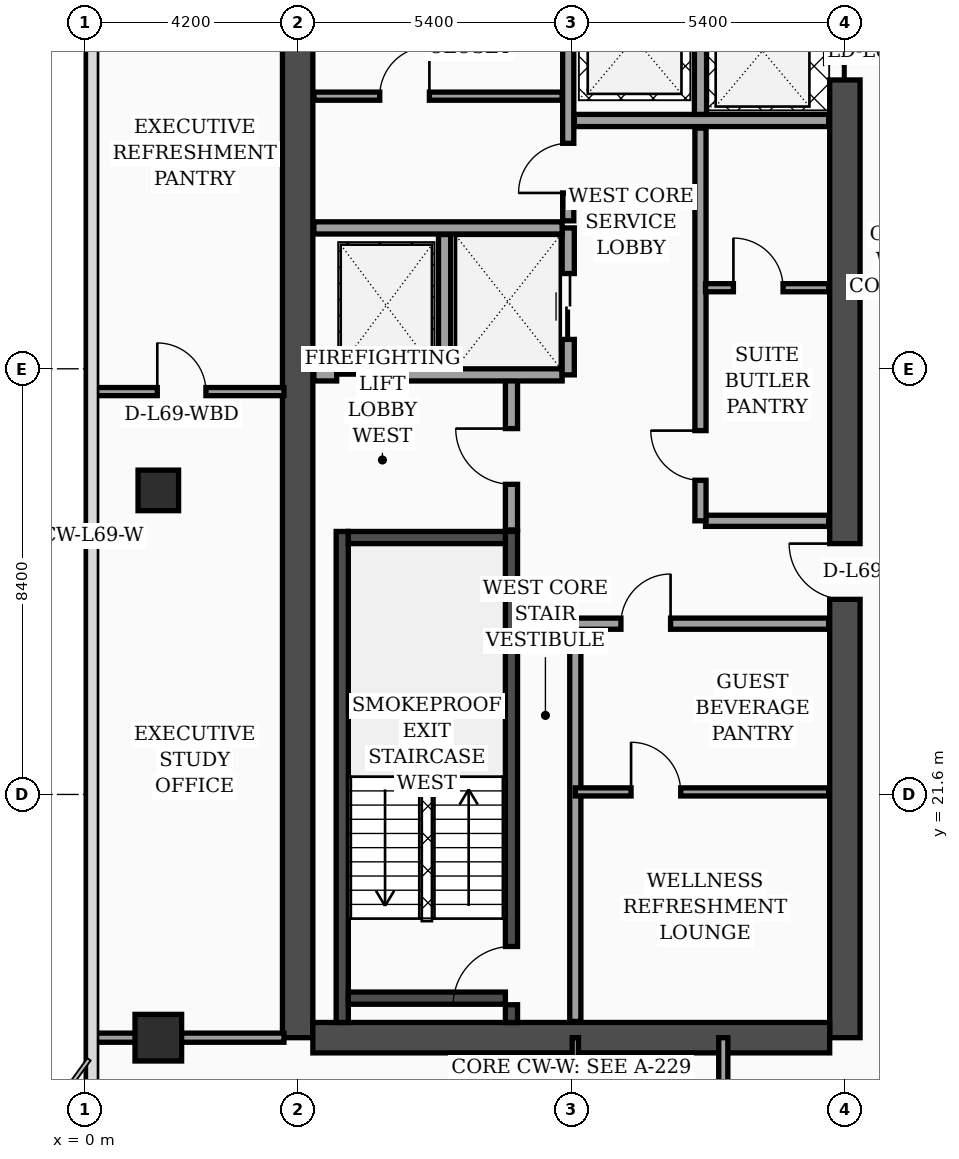
"""IFC4 building model, lengths in metres.
Left out: names, types, materials, properties, quantities, classifications, styles, units other than length and angle.
Written with IfcOpenShell. Run it as: python <this file> out.ifc"""

import sys

from ifc_helpers import new_model, si_unit, direction, frame, frame_2d, origin, origin_2d, place, context, subcontext, project, spatial, rectangle, extrude, element, fill, save


model = new_model("IFC4")
c1 = context("Model", 3, precision=1e-05, world=origin(), true_north=direction((0.0, 1.0)))
c2 = subcontext(c1, "Body", "Model", "MODEL_VIEW")
j1 = project(units=[si_unit("LENGTHUNIT", "METRE"), si_unit("PLANEANGLEUNIT", "RADIAN")], contexts=[c1])
p1 = place(None, origin())
s1 = spatial("IfcSite", under=j1, at=p1, CompositionType="ELEMENT")
p2 = place(p1, origin())
s2 = spatial("IfcBuilding", under=s1, at=p2, CompositionType="ELEMENT")
p3 = place(p2, frame((0.0, 0.0, 278.7)))
s3 = spatial("IfcBuildingStorey", under=s2, at=p3, CompositionType="ELEMENT", Elevation=278.7)
p4 = place(p3, frame((4.2, 16.8, 0.0), z_axis=(0.0, 0.0, 1.0), x_axis=(0.0, 1.0, 0.0)))
e1 = element("IfcWall", 1, at=p4, inside=s3, PredefinedType="SHEAR", context=c2, shape_type="SweptSolid", body=[
    extrude(rectangle(XDim=21.6, YDim=0.6, at=frame_2d((10.8, 0.0))), origin(), (0.0, 0.0, 1.0), 3.52),
])
p5 = place(p3, frame((15.0, 16.8, 0.0), z_axis=(0.0, 0.0, 1.0), x_axis=(0.0, 1.0, 0.0)))
e2 = element("IfcWall", 2, at=p5, inside=s3, PredefinedType="SHEAR", context=c2, shape_type="SweptSolid", body=[
    extrude(rectangle(XDim=21.6, YDim=0.6, at=frame_2d((10.8, 0.0))), origin(), (0.0, 0.0, 1.0), 3.52),
])
p6 = place(p5, frame((8.65, 0.0, 0.0)))
e3 = element("IfcOpeningElement", 3, at=p6, cuts=e2, PredefinedType="OPENING", context=c2, shape_type="SweptSolid", body=[
    extrude(rectangle(XDim=1.1, YDim=2.2, at=frame_2d((0.55, 1.1))), frame((0.0, 0.31, 0.0), z_axis=(0.0, -1.0, 0.0), x_axis=(1.0, 0.0, 0.0)), (0.0, 0.0, 1.0), 0.62),
])
p7 = place(p5, frame((18.9, 0.0, 0.0)))
e4 = element("IfcOpeningElement", 4, at=p7, cuts=e2, PredefinedType="OPENING", context=c2, shape_type="SweptSolid", body=[
    extrude(rectangle(XDim=1.1, YDim=2.2, at=frame_2d((0.55, 1.1))), frame((0.0, 0.31, 0.0), z_axis=(0.0, -1.0, 0.0), x_axis=(1.0, 0.0, 0.0)), (0.0, 0.0, 1.0), 0.62),
])
p8 = place(p3, frame((4.5, 16.8, 0.0), z_axis=(0.0, 0.0, 1.0), x_axis=(1.0, 0.0, 0.0)))
e5 = element("IfcWall", 5, at=p8, inside=s3, PredefinedType="SHEAR", context=c2, shape_type="SweptSolid", body=[
    extrude(rectangle(XDim=10.2, YDim=0.6, at=frame_2d((5.1, 0.0))), origin(), (0.0, 0.0, 1.0), 3.52),
])
p9 = place(p3, frame((5.08, 17.1, 0.0), z_axis=(0.0, 0.0, 1.0), x_axis=(0.0, 1.0, 0.0)))
e6 = element("IfcWall", 6, at=p9, inside=s3, PredefinedType="SOLIDWALL", context=c2, shape_type="SweptSolid", body=[
    extrude(rectangle(XDim=9.69, YDim=0.24, at=frame_2d((4.845, 0.0))), origin(), (0.0, 0.0, 1.0), 3.52),
])
p10 = place(p3, frame((8.42, 17.1, 0.0), z_axis=(0.0, 0.0, 1.0), x_axis=(0.0, 1.0, 0.0)))
e7 = element("IfcWall", 7, at=p10, inside=s3, PredefinedType="SOLIDWALL", context=c2, shape_type="SweptSolid", body=[
    extrude(rectangle(XDim=9.69, YDim=0.24, at=frame_2d((4.845, 0.0))), origin(), (0.0, 0.0, 1.0), 3.52),
])
p11 = place(p10, frame((0.35, 0.0, 0.0)))
e8 = element("IfcOpeningElement", 8, at=p11, cuts=e7, PredefinedType="OPENING", context=c2, shape_type="SweptSolid", body=[
    extrude(rectangle(XDim=1.15, YDim=2.2, at=frame_2d((0.575, 1.1))), frame((0.0, 0.13, 0.0), z_axis=(0.0, -1.0, 0.0), x_axis=(1.0, 0.0, 0.0)), (0.0, 0.0, 1.0), 0.26),
])
for number, where, z_axis, x_axis in (
    (9, (5.2, 17.58, 0.0), (0.0, 0.0, 1.0), (1.0, 0.0, 0.0)),
    (10, (5.2, 26.67, 0.0), (0.0, 0.0, 1.0), (1.0, 0.0, 0.0)),
):
    element("IfcWall", number, at=place(p3, frame(where, z_axis=z_axis, x_axis=x_axis)), inside=s3, PredefinedType="SOLIDWALL", context=c2, shape_type="SweptSolid", body=[
        extrude(rectangle(XDim=3.1, YDim=0.24, at=frame_2d((1.55, 0.0))), origin(), (0.0, 0.0, 1.0), 3.52),
    ])
p12 = place(p3, frame((1.45, 16.8, 0.0), z_axis=(0.0, 0.0, 1.0), x_axis=(1.0, 0.0, 0.0)))
e11 = element("IfcColumn", 11, at=p12, inside=s3, PredefinedType="COLUMN", context=c2, shape_type="SweptSolid", body=[
    extrude(rectangle(XDim=0.92, YDim=0.92, at=origin_2d()), origin(), (0.0, 0.0, 1.0), 3.52),
])
p13 = place(p3, frame((1.45, 27.6, 0.0), z_axis=(0.0, 0.0, 1.0), x_axis=(1.0, 0.0, 0.0)))
e12 = element("IfcColumn", 12, at=p13, inside=s3, PredefinedType="COLUMN", context=c2, shape_type="SweptSolid", body=[
    extrude(rectangle(XDim=0.8, YDim=0.8, at=origin_2d()), origin(), (0.0, 0.0, 1.0), 3.52),
])
p14 = place(p3, frame((8.42, 26.82, 0.0), z_axis=(0.0, 0.0, 1.0), x_axis=(0.0, 1.0, 0.0)))
e13 = element("IfcWall", 13, at=p14, inside=s3, PredefinedType="SOLIDWALL", context=c2, shape_type="SweptSolid", body=[
    extrude(rectangle(XDim=3.0, YDim=0.24, at=frame_2d((1.5, 0.0))), origin(), (0.0, 0.0, 1.0), 3.52),
])
p15 = place(p14, frame((0.9, 0.0, 0.0)))
e14 = element("IfcOpeningElement", 14, at=p15, cuts=e13, PredefinedType="OPENING", context=c2, shape_type="SweptSolid", body=[
    extrude(rectangle(XDim=1.1, YDim=2.2, at=frame_2d((0.55, 1.1))), frame((0.0, 0.13, 0.0), z_axis=(0.0, -1.0, 0.0), x_axis=(1.0, 0.0, 0.0)), (0.0, 0.0, 1.0), 0.26),
])
p16 = place(p3, frame((4.52, 29.88, 0.0), z_axis=(0.0, 0.0, 1.0), x_axis=(1.0, 0.0, 0.0)))
e15 = element("IfcWall", 15, at=p16, inside=s3, PredefinedType="SOLIDWALL", context=c2, shape_type="SweptSolid", body=[
    extrude(rectangle(XDim=4.9, YDim=0.24, at=frame_2d((2.45, 0.0))), origin(), (0.0, 0.0, 1.0), 3.52),
])
p17 = place(p16, frame((0.45, 0.0, 0.0)))
e16 = element("IfcOpeningElement", 16, at=p17, cuts=e15, PredefinedType="OPENING", context=c2, shape_type="SweptSolid", body=[
    extrude(rectangle(XDim=1.3, YDim=2.35, at=frame_2d((0.65, 1.175))), frame((0.0, 0.13, 0.0), z_axis=(0.0, -1.0, 0.0), x_axis=(1.0, 0.0, 0.0)), (0.0, 0.0, 1.0), 0.26),
])
p18 = place(p3, frame((7.1, 30.02, 0.0), z_axis=(0.0, 0.0, 1.0), x_axis=(0.0, 1.0, 0.0)))
e17 = element("IfcWall", 17, at=p18, inside=s3, PredefinedType="SOLIDWALL", context=c2, shape_type="SweptSolid", body=[
    extrude(rectangle(XDim=2.63, YDim=0.24, at=frame_2d((1.315, 0.0))), origin(), (0.0, 0.0, 1.0), 3.52),
])
p19 = place(p3, frame((9.54, 29.88, 0.0), z_axis=(0.0, 0.0, 1.0), x_axis=(0.0, 1.0, 0.0)))
e18 = element("IfcWall", 18, at=p19, inside=s3, PredefinedType="SOLIDWALL", context=c2, shape_type="SweptSolid", body=[
    extrude(rectangle(XDim=2.9, YDim=0.24, at=frame_2d((1.45, 0.0))), origin(), (0.0, 0.0, 1.0), 3.52),
])
p20 = place(p19, frame((0.7, 0.0, 0.0)))
e19 = element("IfcOpeningElement", 19, at=p20, cuts=e18, PredefinedType="OPENING", context=c2, shape_type="SweptSolid", body=[
    extrude(rectangle(XDim=1.3, YDim=2.35, at=frame_2d((0.65, 1.175))), frame((0.0, 0.13, 0.0), z_axis=(0.0, -1.0, 0.0), x_axis=(1.0, 0.0, 0.0)), (0.0, 0.0, 1.0), 0.26),
])
p21 = place(p3, frame((4.52, 32.78, 0.0), z_axis=(0.0, 0.0, 1.0), x_axis=(1.0, 0.0, 0.0)))
e20 = element("IfcWall", 20, at=p21, inside=s3, PredefinedType="SOLIDWALL", context=c2, shape_type="SweptSolid", body=[
    extrude(rectangle(XDim=4.9, YDim=0.24, at=frame_2d((2.45, 0.0))), origin(), (0.0, 0.0, 1.0), 3.17),
])
p22 = place(p3, frame((9.68, 17.12, 0.0), z_axis=(0.0, 0.0, 1.0), x_axis=(0.0, 1.0, 0.0)))
e21 = element("IfcWall", 21, at=p22, inside=s3, PredefinedType="SOLIDWALL", context=c2, shape_type="SweptSolid", body=[
    extrude(rectangle(XDim=7.88, YDim=0.22, at=frame_2d((3.94, 0.0))), origin(), (0.0, 0.0, 1.0), 3.52),
])
p23 = place(p3, frame((4.52, 35.38, 0.0), z_axis=(0.0, 0.0, 1.0), x_axis=(1.0, 0.0, 0.0)))
e22 = element("IfcWall", 22, at=p23, inside=s3, PredefinedType="PARTITIONING", context=c2, shape_type="SweptSolid", body=[
    extrude(rectangle(XDim=4.9, YDim=0.16, at=frame_2d((2.45, 0.0))), origin(), (0.0, 0.0, 1.0), 3.52),
])
p24 = place(p23, frame((1.3, 0.0, 0.0)))
e23 = element("IfcOpeningElement", 23, at=p24, cuts=e22, PredefinedType="OPENING", context=c2, shape_type="SweptSolid", body=[
    extrude(rectangle(XDim=0.98, YDim=2.15, at=frame_2d((0.49, 1.075))), frame((0.0, 0.09, 0.0), z_axis=(0.0, -1.0, 0.0), x_axis=(1.0, 0.0, 0.0)), (0.0, 0.0, 1.0), 0.18),
])
p25 = place(p3, frame((9.54, 32.92, 0.0), z_axis=(0.0, 0.0, 1.0), x_axis=(0.0, 1.0, 0.0)))
e24 = element("IfcWall", 24, at=p25, inside=s3, PredefinedType="SOLIDWALL", context=c2, shape_type="SweptSolid", body=[
    extrude(rectangle(XDim=5.16, YDim=0.22, at=frame_2d((2.58, 0.0))), origin(), (0.0, 0.0, 1.0), 3.52),
])
p26 = place(p25, frame((0.55, 0.0, 0.0)))
e25 = element("IfcOpeningElement", 25, at=p26, cuts=e24, PredefinedType="OPENING", context=c2, shape_type="SweptSolid", body=[
    extrude(rectangle(XDim=0.98, YDim=2.15, at=frame_2d((0.49, 1.075))), frame((0.0, 0.12, 0.0), z_axis=(0.0, -1.0, 0.0), x_axis=(1.0, 0.0, 0.0)), (0.0, 0.0, 1.0), 0.24),
])
p27 = place(p3, frame((9.68, 21.65, 0.0), z_axis=(0.0, 0.0, 1.0), x_axis=(1.0, 0.0, 0.0)))
e26 = element("IfcWall", 26, at=p27, inside=s3, PredefinedType="PARTITIONING", context=c2, shape_type="SweptSolid", body=[
    extrude(rectangle(XDim=5.0, YDim=0.16, at=frame_2d((2.5, 0.0))), origin(), (0.0, 0.0, 1.0), 3.52),
])
p28 = place(p27, frame((1.1, 0.0, 0.0)))
e27 = element("IfcOpeningElement", 27, at=p28, cuts=e26, PredefinedType="OPENING", context=c2, shape_type="SweptSolid", body=[
    extrude(rectangle(XDim=0.98, YDim=2.15, at=frame_2d((0.49, 1.075))), frame((0.0, 0.09, 0.0), z_axis=(0.0, -1.0, 0.0), x_axis=(1.0, 0.0, 0.0)), (0.0, 0.0, 1.0), 0.18),
])
p29 = place(p3, frame((9.68, 24.97, 0.0), z_axis=(0.0, 0.0, 1.0), x_axis=(1.0, 0.0, 0.0)))
e28 = element("IfcWall", 28, at=p29, inside=s3, PredefinedType="SOLIDWALL", context=c2, shape_type="SweptSolid", body=[
    extrude(rectangle(XDim=5.0, YDim=0.22, at=frame_2d((2.5, 0.0))), origin(), (0.0, 0.0, 1.0), 2.97),
])
p30 = place(p29, frame((0.9, 0.0, 0.0)))
e29 = element("IfcOpeningElement", 29, at=p30, cuts=e28, PredefinedType="OPENING", context=c2, shape_type="SweptSolid", body=[
    extrude(rectangle(XDim=0.98, YDim=2.15, at=frame_2d((0.49, 1.075))), frame((0.0, 0.12, 0.0), z_axis=(0.0, -1.0, 0.0), x_axis=(1.0, 0.0, 0.0)), (0.0, 0.0, 1.0), 0.24),
])
p31 = place(p3, frame((12.25, 27.0, 0.0), z_axis=(0.0, 0.0, 1.0), x_axis=(1.0, 0.0, 0.0)))
e30 = element("IfcWall", 30, at=p31, inside=s3, PredefinedType="SOLIDWALL", context=c2, shape_type="SweptSolid", body=[
    extrude(rectangle(XDim=2.43, YDim=0.22, at=frame_2d((1.215, 0.0))), origin(), (0.0, 0.0, 1.0), 3.52),
])
p32 = place(p3, frame((12.15, 27.0, 0.0), z_axis=(0.0, 0.0, 1.0), x_axis=(0.0, 1.0, 0.0)))
e31 = element("IfcWall", 31, at=p32, inside=s3, PredefinedType="SOLIDWALL", context=c2, shape_type="SweptSolid", body=[
    extrude(rectangle(XDim=7.75, YDim=0.22, at=frame_2d((3.875, 0.0))), origin(), (0.0, 0.0, 1.0), 3.52),
])
p33 = place(p32, frame((0.8, 0.0, 0.0)))
e32 = element("IfcOpeningElement", 32, at=p33, cuts=e31, PredefinedType="OPENING", context=c2, shape_type="SweptSolid", body=[
    extrude(rectangle(XDim=0.98, YDim=2.15, at=frame_2d((0.49, 1.075))), frame((0.0, 0.12, 0.0), z_axis=(0.0, -1.0, 0.0), x_axis=(1.0, 0.0, 0.0)), (0.0, 0.0, 1.0), 0.24),
])
p34 = place(p3, frame((12.25, 31.6, 0.0), z_axis=(0.0, 0.0, 1.0), x_axis=(1.0, 0.0, 0.0)))
e33 = element("IfcWall", 33, at=p34, inside=s3, PredefinedType="PARTITIONING", context=c2, shape_type="SweptSolid", body=[
    extrude(rectangle(XDim=2.43, YDim=0.16, at=frame_2d((1.215, 0.0))), origin(), (0.0, 0.0, 1.0), 3.12),
])
p35 = place(p34, frame((0.55, 0.0, 0.0)))
e34 = element("IfcOpeningElement", 34, at=p35, cuts=e33, PredefinedType="OPENING", context=c2, shape_type="SweptSolid", body=[
    extrude(rectangle(XDim=0.98, YDim=2.15, at=frame_2d((0.49, 1.075))), frame((0.0, 0.09, 0.0), z_axis=(0.0, -1.0, 0.0), x_axis=(1.0, 0.0, 0.0)), (0.0, 0.0, 1.0), 0.18),
])
p36 = place(p3, frame((9.66, 34.9, 0.0), z_axis=(0.0, 0.0, 1.0), x_axis=(1.0, 0.0, 0.0)))
e35 = element("IfcWall", 35, at=p36, inside=s3, PredefinedType="SOLIDWALL", context=c2, shape_type="SweptSolid", body=[
    extrude(rectangle(XDim=5.02, YDim=0.24, at=frame_2d((2.51, 0.0))), origin(), (0.0, 0.0, 1.0), 3.52),
])
p37 = place(p3, frame((12.15, 35.02, 0.0), z_axis=(0.0, 0.0, 1.0), x_axis=(0.0, 1.0, 0.0)))
e36 = element("IfcWall", 36, at=p37, inside=s3, PredefinedType="SOLIDWALL", context=c2, shape_type="SweptSolid", body=[
    extrude(rectangle(XDim=3.06, YDim=0.24, at=frame_2d((1.53, 0.0))), origin(), (0.0, 0.0, 1.0), 3.52),
])
p38 = place(p3, frame((0.08, 29.55, 0.0), z_axis=(0.0, 0.0, 1.0), x_axis=(1.0, 0.0, 0.0)))
e37 = element("IfcWall", 37, at=p38, inside=s3, PredefinedType="PARTITIONING", context=c2, shape_type="SweptSolid", body=[
    extrude(rectangle(XDim=3.85, YDim=0.16, at=frame_2d((1.925, 0.0))), origin(), (0.0, 0.0, 1.0), 3.07),
])
p39 = place(p38, frame((1.35, 0.0, 0.0)))
e38 = element("IfcOpeningElement", 38, at=p39, cuts=e37, PredefinedType="OPENING", context=c2, shape_type="SweptSolid", body=[
    extrude(rectangle(XDim=0.96, YDim=2.2, at=frame_2d((0.48, 1.1))), frame((0.0, 0.09, 0.0), z_axis=(0.0, -1.0, 0.0), x_axis=(1.0, 0.0, 0.0)), (0.0, 0.0, 1.0), 0.18),
])
p40 = place(p3, frame((0.08, 16.8, 0.0), z_axis=(0.0, 0.0, 1.0), x_axis=(1.0, 0.0, 0.0)))
e39 = element("IfcWall", 39, at=p40, inside=s3, PredefinedType="PARTITIONING", context=c2, shape_type="SweptSolid", body=[
    extrude(rectangle(XDim=3.85, YDim=0.18, at=frame_2d((1.925, 0.0))), origin(), (0.0, 0.0, 1.0), 2.97),
])
p41 = place(p3, frame((9.68, 14.75, 0.0), z_axis=(0.0, 0.0, 1.0), x_axis=(0.0, 1.0, 0.0)))
e40 = element("IfcWall", 40, at=p41, inside=s3, PredefinedType="PARTITIONING", context=c2, shape_type="SweptSolid", body=[
    extrude(rectangle(XDim=2.05, YDim=0.125, at=frame_2d((1.025, 0.0))), origin(), (0.0, 0.0, 1.0), 3.52),
])
p42 = place(p3, frame((12.6, 2.44, 0.0), z_axis=(0.0, 0.0, 1.0), x_axis=(0.0, 1.0, 0.0)))
e41 = element("IfcWall", 41, at=p42, inside=s3, PredefinedType="PARTITIONING", context=c2, shape_type="SweptSolid", body=[
    extrude(rectangle(XDim=14.36, YDim=0.18, at=frame_2d((7.18, 0.0))), origin(), (0.0, 0.0, 1.0), 2.97),
])
p43 = place(p42, frame((3.01, 0.0, 0.0)))
e42 = element("IfcOpeningElement", 42, at=p43, cuts=e41, PredefinedType="OPENING", context=c2, shape_type="SweptSolid", body=[
    extrude(rectangle(XDim=1.02, YDim=2.2, at=frame_2d((0.51, 1.1))), frame((0.0, 0.1, 0.0), z_axis=(0.0, -1.0, 0.0), x_axis=(1.0, 0.0, 0.0)), (0.0, 0.0, 1.0), 0.2),
])
p44 = place(p42, frame((10.1, 0.0, 0.0)))
e43 = element("IfcOpeningElement", 43, at=p44, cuts=e41, PredefinedType="OPENING", context=c2, shape_type="SweptSolid", body=[
    extrude(rectangle(XDim=1.02, YDim=2.2, at=frame_2d((0.51, 1.1))), frame((0.0, 0.1, 0.0), z_axis=(0.0, -1.0, 0.0), x_axis=(1.0, 0.0, 0.0)), (0.0, 0.0, 1.0), 0.2),
])
p45 = place(p15, origin())
e44 = element("IfcDoor", 44, at=p45, inside=s3, OperationType="SINGLE_SWING_RIGHT", PredefinedType="DOOR", context=c2, shape_type="SweptSolid", body=[
    extrude(rectangle(XDim=1.1, YDim=2.2, at=frame_2d((0.55, 1.1))), frame((0.0, 0.025, 0.0), z_axis=(0.0, -1.0, 0.0), x_axis=(1.0, 0.0, 0.0)), (0.0, 0.0, 1.0), 0.05),
])
fill(e14, e44)
p46 = place(p17, origin())
e45 = element("IfcDoor", 45, at=p46, inside=s3, OperationType="DOUBLE_DOOR_SLIDING", PredefinedType="DOOR", context=c2, shape_type="SweptSolid", body=[
    extrude(rectangle(XDim=1.3, YDim=2.35, at=frame_2d((0.65, 1.175))), frame((0.0, 0.025, 0.0), z_axis=(0.0, -1.0, 0.0), x_axis=(1.0, 0.0, 0.0)), (0.0, 0.0, 1.0), 0.05),
])
fill(e16, e45)
p47 = place(p20, origin())
e46 = element("IfcDoor", 46, at=p47, inside=s3, OperationType="DOUBLE_DOOR_SLIDING", PredefinedType="DOOR", context=c2, shape_type="SweptSolid", body=[
    extrude(rectangle(XDim=1.3, YDim=2.35, at=frame_2d((0.65, 1.175))), frame((0.0, 0.025, 0.0), z_axis=(0.0, -1.0, 0.0), x_axis=(1.0, 0.0, 0.0)), (0.0, 0.0, 1.0), 0.05),
])
fill(e19, e46)
p48 = place(p24, origin())
e47 = element("IfcDoor", 47, at=p48, inside=s3, OperationType="SINGLE_SWING_RIGHT", PredefinedType="DOOR", context=c2, shape_type="SweptSolid", body=[
    extrude(rectangle(XDim=0.98, YDim=2.15, at=frame_2d((0.49, 1.075))), frame((0.0, 0.025, 0.0), z_axis=(0.0, -1.0, 0.0), x_axis=(1.0, 0.0, 0.0)), (0.0, 0.0, 1.0), 0.05),
])
fill(e23, e47)
p49 = place(p26, origin())
e48 = element("IfcDoor", 48, at=p49, inside=s3, OperationType="SINGLE_SWING_LEFT", PredefinedType="DOOR", context=c2, shape_type="SweptSolid", body=[
    extrude(rectangle(XDim=0.98, YDim=2.15, at=frame_2d((0.49, 1.075))), frame((0.0, 0.025, 0.0), z_axis=(0.0, -1.0, 0.0), x_axis=(1.0, 0.0, 0.0)), (0.0, 0.0, 1.0), 0.05),
])
fill(e25, e48)
p50 = place(p28, origin())
e49 = element("IfcDoor", 49, at=p50, inside=s3, OperationType="SINGLE_SWING_LEFT", PredefinedType="DOOR", context=c2, shape_type="SweptSolid", body=[
    extrude(rectangle(XDim=0.98, YDim=2.15, at=frame_2d((0.49, 1.075))), frame((0.0, 0.025, 0.0), z_axis=(0.0, -1.0, 0.0), x_axis=(1.0, 0.0, 0.0)), (0.0, 0.0, 1.0), 0.05),
])
fill(e27, e49)
p51 = place(p30, origin())
e50 = element("IfcDoor", 50, at=p51, inside=s3, OperationType="SINGLE_SWING_RIGHT", PredefinedType="DOOR", context=c2, shape_type="SweptSolid", body=[
    extrude(rectangle(XDim=0.98, YDim=2.15, at=frame_2d((0.49, 1.075))), frame((0.0, 0.025, 0.0), z_axis=(0.0, -1.0, 0.0), x_axis=(1.0, 0.0, 0.0)), (0.0, 0.0, 1.0), 0.05),
])
fill(e29, e50)
p52 = place(p33, origin())
e51 = element("IfcDoor", 51, at=p52, inside=s3, OperationType="SINGLE_SWING_RIGHT", PredefinedType="DOOR", context=c2, shape_type="SweptSolid", body=[
    extrude(rectangle(XDim=0.98, YDim=2.15, at=frame_2d((0.49, 1.075))), frame((0.0, 0.025, 0.0), z_axis=(0.0, -1.0, 0.0), x_axis=(1.0, 0.0, 0.0)), (0.0, 0.0, 1.0), 0.05),
])
fill(e32, e51)
p53 = place(p35, origin())
e52 = element("IfcDoor", 52, at=p53, inside=s3, OperationType="SINGLE_SWING_LEFT", PredefinedType="DOOR", context=c2, shape_type="SweptSolid", body=[
    extrude(rectangle(XDim=0.98, YDim=2.15, at=frame_2d((0.49, 1.075))), frame((0.0, 0.025, 0.0), z_axis=(0.0, -1.0, 0.0), x_axis=(1.0, 0.0, 0.0)), (0.0, 0.0, 1.0), 0.05),
])
fill(e34, e52)
p54 = place(p39, origin())
e53 = element("IfcDoor", 53, at=p54, inside=s3, OperationType="SINGLE_SWING_LEFT", PredefinedType="DOOR", context=c2, shape_type="SweptSolid", body=[
    extrude(rectangle(XDim=0.96, YDim=2.2, at=frame_2d((0.48, 1.1))), frame((0.0, 0.025, 0.0), z_axis=(0.0, -1.0, 0.0), x_axis=(1.0, 0.0, 0.0)), (0.0, 0.0, 1.0), 0.05),
])
fill(e38, e53)
p55 = place(p11, origin())
e54 = element("IfcDoor", 54, at=p55, inside=s3, OperationType="SINGLE_SWING_LEFT", PredefinedType="DOOR", context=c2, shape_type="SweptSolid", body=[
    extrude(rectangle(XDim=1.15, YDim=2.2, at=frame_2d((0.575, 1.1))), frame((0.0, 0.025, 0.0), z_axis=(0.0, -1.0, 0.0), x_axis=(1.0, 0.0, 0.0)), (0.0, 0.0, 1.0), 0.05),
])
fill(e8, e54)
p56 = place(p6, origin())
e55 = element("IfcDoor", 55, at=p56, inside=s3, OperationType="SINGLE_SWING_RIGHT", PredefinedType="DOOR", context=c2, shape_type="SweptSolid", body=[
    extrude(rectangle(XDim=1.1, YDim=2.2, at=frame_2d((0.55, 1.1))), frame((0.0, 0.025, 0.0), z_axis=(0.0, -1.0, 0.0), x_axis=(1.0, 0.0, 0.0)), (0.0, 0.0, 1.0), 0.05),
])
fill(e3, e55)
p57 = place(p7, origin())
e56 = element("IfcDoor", 56, at=p57, inside=s3, OperationType="DOUBLE_DOOR_SLIDING", PredefinedType="DOOR", context=c2, shape_type="SweptSolid", body=[
    extrude(rectangle(XDim=1.1, YDim=2.2, at=frame_2d((0.55, 1.1))), frame((0.0, 0.025, 0.0), z_axis=(0.0, -1.0, 0.0), x_axis=(1.0, 0.0, 0.0)), (0.0, 0.0, 1.0), 0.05),
])
fill(e4, e56)
save(model, sys.argv[1])
